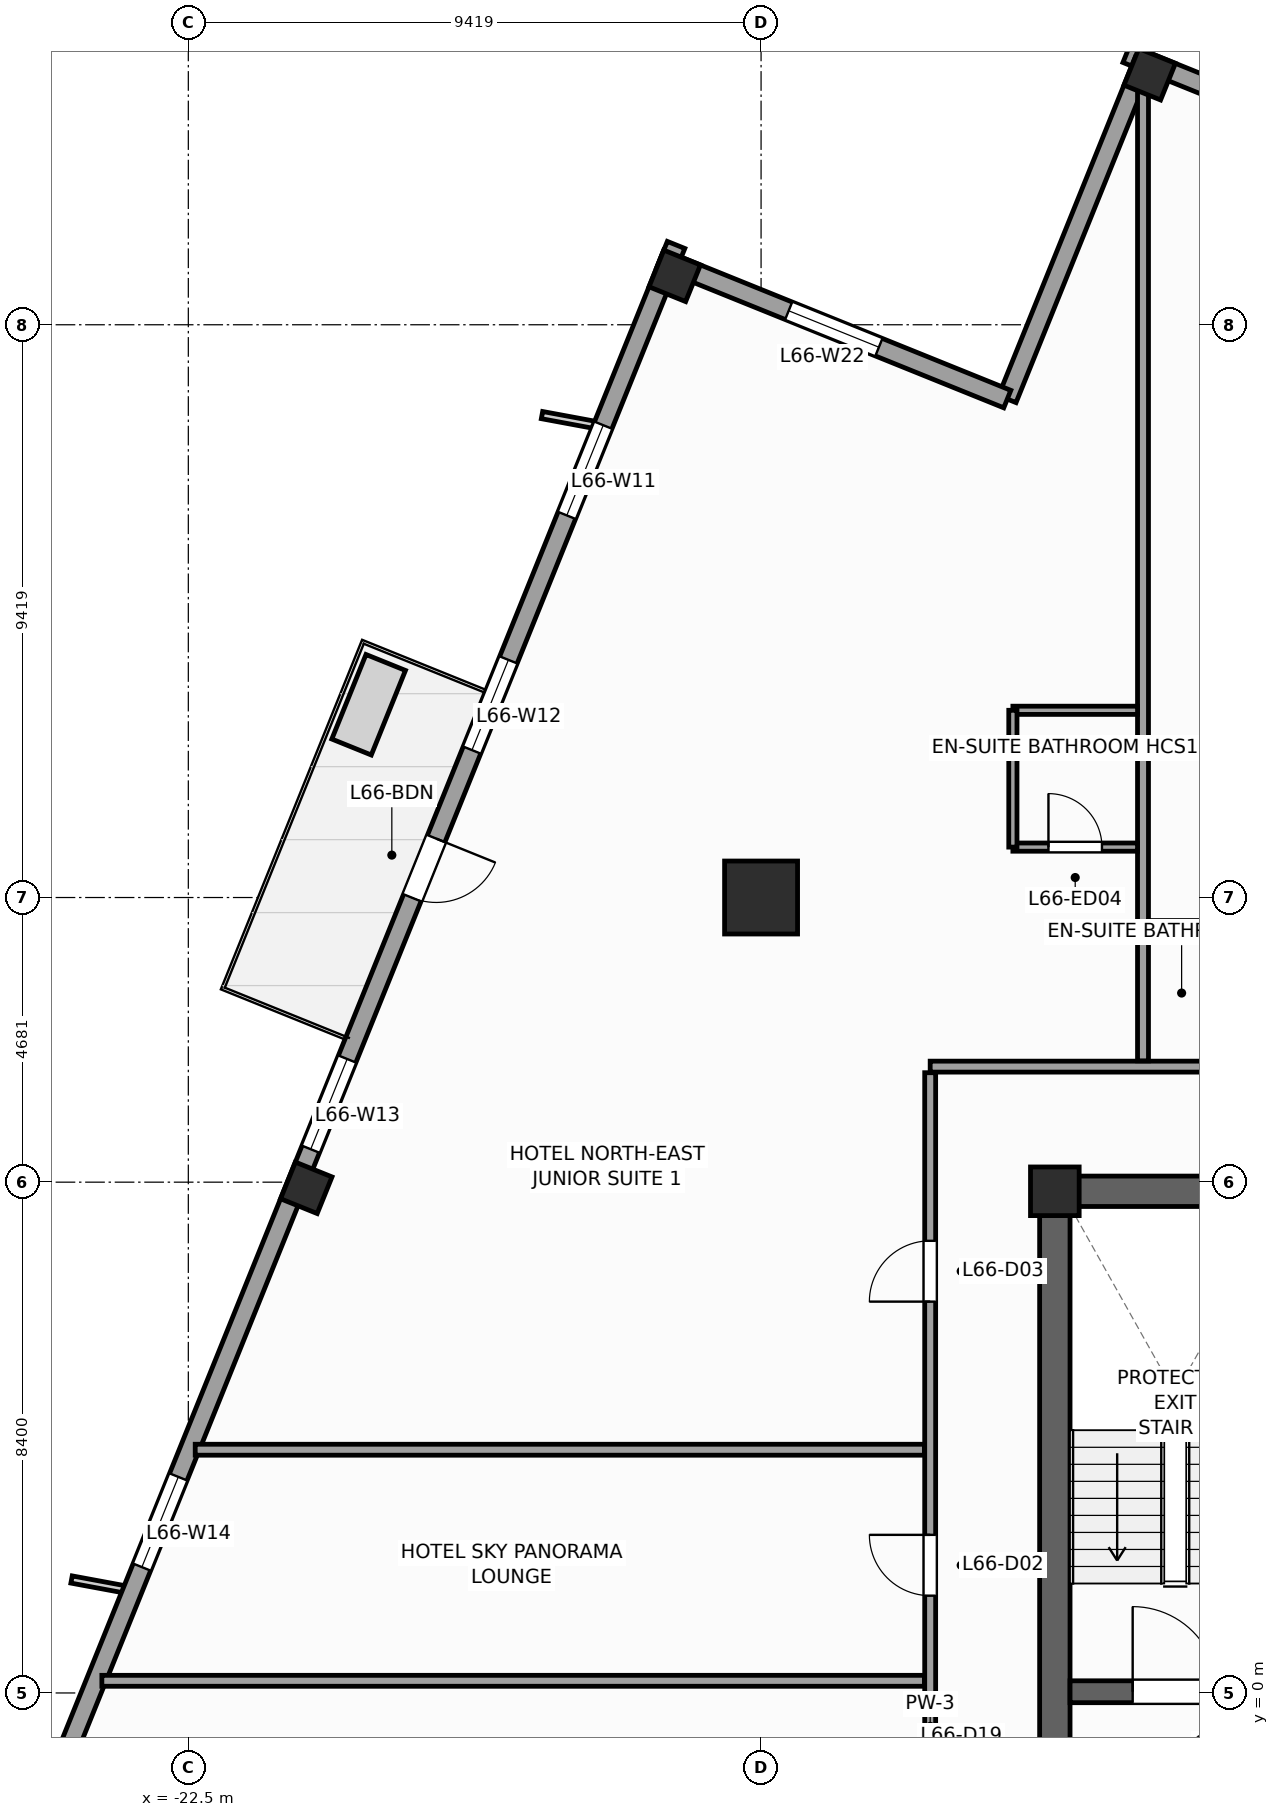
"""IFC4 building model, lengths in metres.
Left out: names, types, materials, properties, quantities, classifications, styles, units other than length and angle.
Written with IfcOpenShell. Run it as: python <this file> out.ifc"""

import sys

from ifc_helpers import new_model, si_unit, direction, frame, frame_2d, origin, origin_2d, place, context, subcontext, project, spatial, rectangle, extrude, source, transform, mapped, element, fill, save


model = new_model("IFC4")
c1 = context("Model", 3, precision=1e-05, world=origin(), true_north=direction((0.0, 1.0)))
c2 = subcontext(c1, "Body", "Model", "MODEL_VIEW")
j1 = project(units=[si_unit("LENGTHUNIT", "METRE"), si_unit("PLANEANGLEUNIT", "RADIAN")], contexts=[c1])
p1 = place(None, origin())
s1 = spatial("IfcSite", under=j1, at=p1, CompositionType="ELEMENT")
p2 = place(p1, origin())
s2 = spatial("IfcBuilding", under=s1, at=p2, CompositionType="ELEMENT")
p3 = place(p2, frame((0.0, 0.0, 272.4)))
s3 = spatial("IfcBuildingStorey", under=s2, at=p3, CompositionType="ELEMENT", Elevation=272.4)
p4 = place(p3, frame((-8.5, 8.25, 0.0), z_axis=(0.0, 0.0, 1.0), x_axis=(1.0, 0.0, 0.0)))
e1 = element("IfcWall", 1, at=p4, inside=s3, PredefinedType="SHEAR", context=c2, shape_type="SweptSolid", body=[
    extrude(rectangle(XDim=17.0, YDim=0.5, at=frame_2d((8.5, 0.0))), origin(), (0.0, 0.0, 1.0), 3.6),
])
p5 = place(p3, frame((-8.25, -8.0, 0.0), z_axis=(0.0, 0.0, 1.0), x_axis=(0.0, 1.0, 0.0)))
e2 = element("IfcWall", 2, at=p5, inside=s3, PredefinedType="SHEAR", context=c2, shape_type="SweptSolid", body=[
    extrude(rectangle(XDim=16.0, YDim=0.5, at=frame_2d((8.0, 0.0))), origin(), (0.0, 0.0, 1.0), 3.6),
])
p6 = place(p5, frame((4.69, 0.0, 0.0)))
e3 = element("IfcOpeningElement", 3, at=p6, cuts=e2, PredefinedType="OPENING", context=c2, shape_type="SweptSolid", body=[
    extrude(rectangle(XDim=1.3, YDim=2.2, at=frame_2d((0.65, 1.1))), frame((0.0, 0.26, 0.0), z_axis=(0.0, -1.0, 0.0), x_axis=(1.0, 0.0, 0.0)), (0.0, 0.0, 1.0), 0.52),
])
p7 = place(p3, frame((-8.0, 0.02, 0.0), z_axis=(0.0, 0.0, 1.0), x_axis=(1.0, 0.0, 0.0)))
e4 = element("IfcWall", 4, at=p7, inside=s3, PredefinedType="SHEAR", context=c2, shape_type="SweptSolid", body=[
    extrude(rectangle(XDim=3.46, YDim=0.36, at=frame_2d((1.73, 0.0))), origin(), (0.0, 0.0, 1.0), 3.6),
])
p8 = place(p7, frame((1.03, 0.0, 0.0)))
e5 = element("IfcOpeningElement", 5, at=p8, cuts=e4, PredefinedType="OPENING", context=c2, shape_type="SweptSolid", body=[
    extrude(rectangle(XDim=1.4, YDim=2.2, at=frame_2d((0.7, 1.1))), frame((0.0, 0.19, 0.0), z_axis=(0.0, -1.0, 0.0), x_axis=(1.0, 0.0, 0.0)), (0.0, 0.0, 1.0), 0.38),
])
m1 = source(origin(), c2, "Body", "SweptSolid", [
    extrude(rectangle(XDim=0.8, YDim=0.8, at=origin_2d()), origin(), (0.0, 0.0, 1.0), 3.6),
])
p9 = place(p3, frame((-8.25, 8.25, 0.0), z_axis=(0.0, 0.0, 1.0), x_axis=(1.0, 0.0, 0.0)))
e6 = element("IfcColumn", 6, at=p9, inside=s3, PredefinedType="PILASTER", context=c2, shape_type="MappedRepresentation", body=[
    mapped(m1, transform((0.0, 0.0, 0.0), scale=1.0)),
])
m2 = source(origin(), c2, "Body", "SweptSolid", [
    extrude(rectangle(XDim=1.2, YDim=1.2, at=origin_2d()), origin(), (0.0, 0.0, 1.0), 3.6),
])
p10 = place(p3, frame((-13.081, 13.081, 0.0), z_axis=(0.0, 0.0, 1.0), x_axis=(1.0, 0.0, 0.0)))
e7 = element("IfcColumn", 7, at=p10, inside=s3, PredefinedType="COLUMN", context=c2, shape_type="MappedRepresentation", body=[
    mapped(m2, transform((0.0, 0.0, 0.0), scale=1.0)),
])
m3 = source(origin(), c2, "Body", "SweptSolid", [
    extrude(rectangle(XDim=0.65, YDim=0.65, at=origin_2d()), origin(), (0.0, 0.0, 1.0), 3.6),
])
for number, where, z_axis, x_axis in (
    (8, (-6.69, 26.62, 0.0), (0.0, 0.0, 1.0), (0.375, 0.927, 0.0)),
    (9, (-14.501, 23.304, 0.0), (0.0, 0.0, 1.0), (0.375, 0.927, 0.0)),
    (10, (-20.56, 8.307, 0.0), (0.0, 0.0, 1.0), (0.375, 0.927, 0.0)),
):
    element("IfcColumn", number, at=place(p3, frame(where, z_axis=z_axis, x_axis=x_axis)), inside=s3, PredefinedType="COLUMN", context=c2, shape_type="MappedRepresentation", body=[
        mapped(m3, transform((0.0, 0.0, 0.0), scale=1.0)),
    ])
p11 = place(p3, frame((23.813, 14.479, 0.0), z_axis=(0.0, 0.0, 1.0), x_axis=(-0.927182657188, 0.374609557019, 0.0)))
e11 = element("IfcWall", 11, at=p11, inside=s3, PredefinedType="STANDARD", context=c2, shape_type="SweptSolid", body=[
    extrude(rectangle(XDim=33.31, YDim=0.31, at=frame_2d((16.655, 0.0))), origin(), (0.0, 0.0, 1.0), 2.75),
])
p12 = place(p11, frame((3.197, 0.0, 0.47)))
e12 = element("IfcOpeningElement", 12, at=p12, cuts=e11, PredefinedType="OPENING", context=c2, shape_type="SweptSolid", body=[
    extrude(rectangle(XDim=1.6, YDim=2.1, at=frame_2d((0.8, 1.05))), frame((0.0, 0.165, 0.0), z_axis=(0.0, -1.0, 0.0), x_axis=(1.0, 0.0, 0.0)), (0.0, 0.0, 1.0), 0.33),
])
p13 = place(p11, frame((8.86, 0.0, 0.47)))
e13 = element("IfcOpeningElement", 13, at=p13, cuts=e11, PredefinedType="OPENING", context=c2, shape_type="SweptSolid", body=[
    extrude(rectangle(XDim=1.6, YDim=2.1, at=frame_2d((0.8, 1.05))), frame((0.0, 0.165, 0.0), z_axis=(0.0, -1.0, 0.0), x_axis=(1.0, 0.0, 0.0)), (0.0, 0.0, 1.0), 0.33),
])
p14 = place(p11, frame((13.689, 0.0, 0.47)))
e14 = element("IfcOpeningElement", 14, at=p14, cuts=e11, PredefinedType="OPENING", context=c2, shape_type="SweptSolid", body=[
    extrude(rectangle(XDim=1.6, YDim=2.1, at=frame_2d((0.8, 1.05))), frame((0.0, 0.165, 0.0), z_axis=(0.0, -1.0, 0.0), x_axis=(1.0, 0.0, 0.0)), (0.0, 0.0, 1.0), 0.33),
])
p15 = place(p11, frame((21.851, 0.0, 0.47)))
e15 = element("IfcOpeningElement", 15, at=p15, cuts=e11, PredefinedType="OPENING", context=c2, shape_type="SweptSolid", body=[
    extrude(rectangle(XDim=1.6, YDim=2.1, at=frame_2d((0.8, 1.05))), frame((0.0, 0.165, 0.0), z_axis=(0.0, -1.0, 0.0), x_axis=(1.0, 0.0, 0.0)), (0.0, 0.0, 1.0), 0.33),
])
p16 = place(p11, frame((27.847, 0.0, 0.47)))
e16 = element("IfcOpeningElement", 16, at=p16, cuts=e11, PredefinedType="OPENING", context=c2, shape_type="SweptSolid", body=[
    extrude(rectangle(XDim=1.6, YDim=2.1, at=frame_2d((0.8, 1.05))), frame((0.0, 0.165, 0.0), z_axis=(0.0, -1.0, 0.0), x_axis=(1.0, 0.0, 0.0)), (0.0, 0.0, 1.0), 0.33),
])
p17 = place(p3, frame((-6.784, 26.841, 0.0), z_axis=(0.0, 0.0, 1.0), x_axis=(-0.374636620962, -0.927171722085, 0.0)))
e17 = element("IfcWall", 17, at=p17, inside=s3, PredefinedType="STANDARD", context=c2, shape_type="SweptSolid", body=[
    extrude(rectangle(XDim=6.0, YDim=0.31, at=frame_2d((3.0, 0.0))), origin(), (0.0, 0.0, 1.0), 2.65),
])
p18 = place(p3, frame((-9.032, 21.278, 0.0), z_axis=(0.0, 0.0, 1.0), x_axis=(-0.927185411764, 0.374602739196, 0.0)))
e18 = element("IfcWall", 18, at=p18, inside=s3, PredefinedType="STANDARD", context=c2, shape_type="SweptSolid", body=[
    extrude(rectangle(XDim=6.155, YDim=0.31, at=frame_2d((3.078, 0.0))), origin(), (0.0, 0.0, 1.0), 3.35),
])
p19 = place(p18, frame((2.278, 0.0, 0.47)))
e19 = element("IfcOpeningElement", 19, at=p19, cuts=e18, PredefinedType="OPENING", context=c2, shape_type="SweptSolid", body=[
    extrude(rectangle(XDim=1.6, YDim=2.1, at=frame_2d((0.8, 1.05))), frame((0.0, 0.165, 0.0), z_axis=(0.0, -1.0, 0.0), x_axis=(1.0, 0.0, 0.0)), (0.0, 0.0, 1.0), 0.33),
])
p20 = place(p3, frame((-14.479, 23.813, 0.0), z_axis=(0.0, 0.0, 1.0), x_axis=(-0.374609557019, -0.927182657188, 0.0)))
e20 = element("IfcWall", 20, at=p20, inside=s3, PredefinedType="STANDARD", context=c2, shape_type="SweptSolid", body=[
    extrude(rectangle(XDim=33.31, YDim=0.31, at=frame_2d((16.655, 0.0))), origin(), (0.0, 0.0, 1.0), 2.75),
])
p21 = place(p20, frame((10.53, 0.0, 0.0)))
e21 = element("IfcOpeningElement", 21, at=p21, cuts=e20, PredefinedType="OPENING", context=c2, shape_type="SweptSolid", body=[
    extrude(rectangle(XDim=1.05, YDim=2.25, at=frame_2d((0.525, 1.125))), frame((0.0, 0.165, 0.0), z_axis=(0.0, -1.0, 0.0), x_axis=(1.0, 0.0, 0.0)), (0.0, 0.0, 1.0), 0.33),
])
p22 = place(p20, frame((3.197, 0.0, 0.47)))
e22 = element("IfcOpeningElement", 22, at=p22, cuts=e20, PredefinedType="OPENING", context=c2, shape_type="SweptSolid", body=[
    extrude(rectangle(XDim=1.6, YDim=2.1, at=frame_2d((0.8, 1.05))), frame((0.0, 0.165, 0.0), z_axis=(0.0, -1.0, 0.0), x_axis=(1.0, 0.0, 0.0)), (0.0, 0.0, 1.0), 0.33),
])
p23 = place(p20, frame((7.36, 0.0, 0.47)))
e23 = element("IfcOpeningElement", 23, at=p23, cuts=e20, PredefinedType="OPENING", context=c2, shape_type="SweptSolid", body=[
    extrude(rectangle(XDim=1.6, YDim=2.1, at=frame_2d((0.8, 1.05))), frame((0.0, 0.165, 0.0), z_axis=(0.0, -1.0, 0.0), x_axis=(1.0, 0.0, 0.0)), (0.0, 0.0, 1.0), 0.33),
])
p24 = place(p20, frame((14.439, 0.0, 0.47)))
e24 = element("IfcOpeningElement", 24, at=p24, cuts=e20, PredefinedType="OPENING", context=c2, shape_type="SweptSolid", body=[
    extrude(rectangle(XDim=1.6, YDim=2.1, at=frame_2d((0.8, 1.05))), frame((0.0, 0.165, 0.0), z_axis=(0.0, -1.0, 0.0), x_axis=(1.0, 0.0, 0.0)), (0.0, 0.0, 1.0), 0.33),
])
p25 = place(p20, frame((21.851, 0.0, 0.47)))
e25 = element("IfcOpeningElement", 25, at=p25, cuts=e20, PredefinedType="OPENING", context=c2, shape_type="SweptSolid", body=[
    extrude(rectangle(XDim=1.6, YDim=2.1, at=frame_2d((0.8, 1.05))), frame((0.0, 0.165, 0.0), z_axis=(0.0, -1.0, 0.0), x_axis=(1.0, 0.0, 0.0)), (0.0, 0.0, 1.0), 0.33),
])
p26 = place(p20, frame((30.097, 0.0, 0.47)))
e26 = element("IfcOpeningElement", 26, at=p26, cuts=e20, PredefinedType="OPENING", context=c2, shape_type="SweptSolid", body=[
    extrude(rectangle(XDim=1.6, YDim=2.1, at=frame_2d((0.8, 1.05))), frame((0.0, 0.165, 0.0), z_axis=(0.0, -1.0, 0.0), x_axis=(1.0, 0.0, 0.0)), (0.0, 0.0, 1.0), 0.33),
])
p27 = place(p20, frame((27.374, 0.0, 0.47)))
e27 = element("IfcOpeningElement", 27, at=p27, cuts=e20, PredefinedType="OPENING", context=c2, shape_type="SweptSolid", body=[
    extrude(rectangle(XDim=1.6, YDim=2.1, at=frame_2d((0.8, 1.05))), frame((0.0, 0.165, 0.0), z_axis=(0.0, -1.0, 0.0), x_axis=(1.0, 0.0, 0.0)), (0.0, 0.0, 1.0), 0.33),
])
p28 = place(p3, frame((-10.3, 10.3, 0.0), z_axis=(0.0, 0.0, 1.0), x_axis=(1.0, 0.0, 0.0)))
e28 = element("IfcWall", 28, at=p28, inside=s3, PredefinedType="PARTITIONING", context=c2, shape_type="SweptSolid", body=[
    extrude(rectangle(XDim=21.7, YDim=0.18, at=frame_2d((10.85, 0.0))), origin(), (0.0, 0.0, 1.0), 3.35),
])
p29 = place(p28, frame((9.8, 0.0, 0.0)))
e29 = element("IfcOpeningElement", 29, at=p29, cuts=e28, PredefinedType="OPENING", context=c2, shape_type="SweptSolid", body=[
    extrude(rectangle(XDim=1.0, YDim=2.15, at=frame_2d((0.5, 1.075))), frame((0.0, 0.1, 0.0), z_axis=(0.0, -1.0, 0.0), x_axis=(1.0, 0.0, 0.0)), (0.0, 0.0, 1.0), 0.2),
])
p30 = place(p3, frame((-10.3, -11.3, 0.0), z_axis=(0.0, 0.0, 1.0), x_axis=(0.0, 1.0, 0.0)))
e30 = element("IfcWall", 30, at=p30, inside=s3, PredefinedType="PARTITIONING", context=c2, shape_type="SweptSolid", body=[
    extrude(rectangle(XDim=21.5, YDim=0.18, at=frame_2d((10.75, 0.0))), origin(), (0.0, 0.0, 1.0), 3.35),
])
p31 = place(p30, frame((12.9, 0.0, 0.0)))
e31 = element("IfcOpeningElement", 31, at=p31, cuts=e30, PredefinedType="OPENING", context=c2, shape_type="SweptSolid", body=[
    extrude(rectangle(XDim=1.0, YDim=2.15, at=frame_2d((0.5, 1.075))), frame((0.0, 0.1, 0.0), z_axis=(0.0, -1.0, 0.0), x_axis=(1.0, 0.0, 0.0)), (0.0, 0.0, 1.0), 0.2),
])
p32 = place(p30, frame((17.736, 0.0, 0.0)))
e32 = element("IfcOpeningElement", 32, at=p32, cuts=e30, PredefinedType="OPENING", context=c2, shape_type="SweptSolid", body=[
    extrude(rectangle(XDim=1.0, YDim=2.15, at=frame_2d((0.5, 1.075))), frame((0.0, 0.1, 0.0), z_axis=(0.0, -1.0, 0.0), x_axis=(1.0, 0.0, 0.0)), (0.0, 0.0, 1.0), 0.2),
])
p33 = place(p30, frame((1.714, 0.0, 0.0)))
e33 = element("IfcOpeningElement", 33, at=p33, cuts=e30, PredefinedType="OPENING", context=c2, shape_type="SweptSolid", body=[
    extrude(rectangle(XDim=1.0, YDim=2.15, at=frame_2d((0.5, 1.075))), frame((0.0, 0.1, 0.0), z_axis=(0.0, -1.0, 0.0), x_axis=(1.0, 0.0, 0.0)), (0.0, 0.0, 1.0), 0.2),
])
p34 = place(p30, frame((5.4, 0.0, 0.0)))
e34 = element("IfcOpeningElement", 34, at=p34, cuts=e30, PredefinedType="OPENING", context=c2, shape_type="SweptSolid", body=[
    extrude(rectangle(XDim=1.0, YDim=2.15, at=frame_2d((0.5, 1.075))), frame((0.0, 0.1, 0.0), z_axis=(0.0, -1.0, 0.0), x_axis=(1.0, 0.0, 0.0)), (0.0, 0.0, 1.0), 0.2),
])
p35 = place(p30, frame((9.1, 0.0, 0.0)))
e35 = element("IfcOpeningElement", 35, at=p35, cuts=e30, PredefinedType="OPENING", context=c2, shape_type="SweptSolid", body=[
    extrude(rectangle(XDim=1.0, YDim=2.15, at=frame_2d((0.5, 1.075))), frame((0.0, 0.1, 0.0), z_axis=(0.0, -1.0, 0.0), x_axis=(1.0, 0.0, 0.0)), (0.0, 0.0, 1.0), 0.2),
])
p36 = place(p3, frame((-6.8, 10.395, 0.0), z_axis=(0.0, 0.0, 1.0), x_axis=(0.0, 1.0, 0.0)))
e36 = element("IfcWall", 36, at=p36, inside=s3, PredefinedType="PARTITIONING", context=c2, shape_type="SweptSolid", body=[
    extrude(rectangle(XDim=16.167, YDim=0.18, at=frame_2d((8.083, 0.0))), origin(), (0.0, 0.0, 1.0), 3.35),
])
p37 = place(p3, frame((-10.395, 0.2, 0.0), z_axis=(0.0, 0.0, 1.0), x_axis=(-1.0, 0.0, 0.0)))
e37 = element("IfcWall", 37, at=p37, inside=s3, PredefinedType="PARTITIONING", context=c2, shape_type="SweptSolid", body=[
    extrude(rectangle(XDim=13.527, YDim=0.18, at=frame_2d((6.763, 0.0))), origin(), (0.0, 0.0, 1.0), 3.35),
])
p38 = place(p3, frame((-10.395, 4.0, 0.0), z_axis=(0.0, 0.0, 1.0), x_axis=(-1.0, 0.0, 0.0)))
e38 = element("IfcWall", 38, at=p38, inside=s3, PredefinedType="PARTITIONING", context=c2, shape_type="SweptSolid", body=[
    extrude(rectangle(XDim=11.992, YDim=0.18, at=frame_2d((5.996, 0.0))), origin(), (0.0, 0.0, 1.0), 3.35),
])
p39 = place(p3, frame((-8.94, 13.91, 0.0), z_axis=(0.0, 0.0, 1.0), x_axis=(1.0, 0.0, 0.0)))
e39 = element("IfcWall", 39, at=p39, inside=s3, PredefinedType="PARTITIONING", context=c2, shape_type="SweptSolid", body=[
    extrude(rectangle(XDim=2.05, YDim=0.135, at=frame_2d((1.025, 0.0))), origin(), (0.0, 0.0, 1.0), 3.35),
])
p40 = place(p39, frame((0.585, 0.0, 0.0)))
e40 = element("IfcOpeningElement", 40, at=p40, cuts=e39, PredefinedType="OPENING", context=c2, shape_type="SweptSolid", body=[
    extrude(rectangle(XDim=0.88, YDim=2.1, at=frame_2d((0.44, 1.05))), frame((0.0, 0.078, 0.0), z_axis=(0.0, -1.0, 0.0), x_axis=(1.0, 0.0, 0.0)), (0.0, 0.0, 1.0), 0.155),
])
p41 = place(p3, frame((-8.94, 16.16, 0.0), z_axis=(0.0, 0.0, 1.0), x_axis=(1.0, 0.0, 0.0)))
e41 = element("IfcWall", 41, at=p41, inside=s3, PredefinedType="PARTITIONING", context=c2, shape_type="SweptSolid", body=[
    extrude(rectangle(XDim=2.05, YDim=0.135, at=frame_2d((1.025, 0.0))), origin(), (0.0, 0.0, 1.0), 3.35),
])
p42 = place(p3, frame((-8.94, 13.91, 0.0), z_axis=(0.0, 0.0, 1.0), x_axis=(0.0, 1.0, 0.0)))
e42 = element("IfcWall", 42, at=p42, inside=s3, PredefinedType="PARTITIONING", context=c2, shape_type="SweptSolid", body=[
    extrude(rectangle(XDim=2.25, YDim=0.135, at=frame_2d((1.125, 0.0))), origin(), (0.0, 0.0, 1.0), 3.35),
])
p43 = place(p3, frame((-6.71, 12.635, 0.0), z_axis=(0.0, 0.0, 1.0), x_axis=(1.0, 0.0, 0.0)))
e43 = element("IfcWall", 43, at=p43, inside=s3, PredefinedType="PARTITIONING", context=c2, shape_type="SweptSolid", body=[
    extrude(rectangle(XDim=2.05, YDim=0.135, at=frame_2d((1.025, 0.0))), origin(), (0.0, 0.0, 1.0), 3.35),
])
m4 = source(origin(), c2, "Body", "SweptSolid", [
    extrude(rectangle(XDim=1.05, YDim=2.25, at=frame_2d((0.525, 1.125))), frame((0.0, 0.025, 0.0), z_axis=(0.0, -1.0, 0.0), x_axis=(1.0, 0.0, 0.0)), (0.0, 0.0, 1.0), 0.05),
])
p44 = place(p21, origin())
e44 = element("IfcDoor", 44, at=p44, inside=s3, OperationType="SINGLE_SWING_LEFT", PredefinedType="DOOR", context=c2, shape_type="MappedRepresentation", body=[
    mapped(m4, transform((0.0, 0.0, 0.0), scale=1.0)),
])
fill(e21, e44)
m5 = source(origin(), c2, "Body", "SweptSolid", [
    extrude(rectangle(XDim=1.6, YDim=2.1, at=frame_2d((0.8, 1.05))), frame((0.0, 0.03, 0.0), z_axis=(0.0, -1.0, 0.0), x_axis=(1.0, 0.0, 0.0)), (0.0, 0.0, 1.0), 0.06),
])
p45 = place(p22, origin())
e45 = element("IfcWindow", 45, at=p45, inside=s3, PartitioningType="SINGLE_PANEL", PredefinedType="WINDOW", context=c2, shape_type="MappedRepresentation", body=[
    mapped(m5, transform((0.0, 0.0, 0.0), scale=1.0)),
])
fill(e22, e45)
p46 = place(p23, origin())
e46 = element("IfcWindow", 46, at=p46, inside=s3, PartitioningType="SINGLE_PANEL", PredefinedType="WINDOW", context=c2, shape_type="MappedRepresentation", body=[
    mapped(m5, transform((0.0, 0.0, 0.0), scale=1.0)),
])
fill(e23, e46)
p47 = place(p24, origin())
e47 = element("IfcWindow", 47, at=p47, inside=s3, PartitioningType="SINGLE_PANEL", PredefinedType="WINDOW", context=c2, shape_type="MappedRepresentation", body=[
    mapped(m5, transform((0.0, 0.0, 0.0), scale=1.0)),
])
fill(e24, e47)
p48 = place(p25, origin())
e48 = element("IfcWindow", 48, at=p48, inside=s3, PartitioningType="SINGLE_PANEL", PredefinedType="WINDOW", context=c2, shape_type="MappedRepresentation", body=[
    mapped(m5, transform((0.0, 0.0, 0.0), scale=1.0)),
])
fill(e25, e48)
p49 = place(p19, origin())
e49 = element("IfcWindow", 49, at=p49, inside=s3, PartitioningType="SINGLE_PANEL", PredefinedType="WINDOW", context=c2, shape_type="MappedRepresentation", body=[
    mapped(m5, transform((0.0, 0.0, 0.0), scale=1.0)),
])
fill(e19, e49)
m6 = source(origin(), c2, "Body", "SweptSolid", [
    extrude(rectangle(XDim=1.4, YDim=2.2, at=frame_2d((0.7, 1.1))), frame((0.0, 0.025, 0.0), z_axis=(0.0, -1.0, 0.0), x_axis=(1.0, 0.0, 0.0)), (0.0, 0.0, 1.0), 0.05),
])
p50 = place(p8, origin())
e50 = element("IfcDoor", 50, at=p50, inside=s3, OperationType="SINGLE_SWING_LEFT", PredefinedType="DOOR", context=c2, shape_type="MappedRepresentation", body=[
    mapped(m6, transform((0.0, 0.0, 0.0), scale=1.0)),
])
fill(e5, e50)
m7 = source(origin(), c2, "Body", "SweptSolid", [
    extrude(rectangle(XDim=1.0, YDim=2.15, at=frame_2d((0.5, 1.075))), frame((0.0, 0.025, 0.0), z_axis=(0.0, -1.0, 0.0), x_axis=(1.0, 0.0, 0.0)), (0.0, 0.0, 1.0), 0.05),
])
p51 = place(p31, origin())
e51 = element("IfcDoor", 51, at=p51, inside=s3, OperationType="SINGLE_SWING_RIGHT", PredefinedType="DOOR", context=c2, shape_type="MappedRepresentation", body=[
    mapped(m7, transform((0.0, 0.0, 0.0), scale=1.0)),
])
fill(e31, e51)
p52 = place(p32, origin())
e52 = element("IfcDoor", 52, at=p52, inside=s3, OperationType="SINGLE_SWING_LEFT", PredefinedType="DOOR", context=c2, shape_type="MappedRepresentation", body=[
    mapped(m7, transform((0.0, 0.0, 0.0), scale=1.0)),
])
fill(e32, e52)
m8 = source(origin(), c2, "Body", "SweptSolid", [
    extrude(rectangle(XDim=0.88, YDim=2.1, at=frame_2d((0.44, 1.05))), frame((0.0, 0.025, 0.0), z_axis=(0.0, -1.0, 0.0), x_axis=(1.0, 0.0, 0.0)), (0.0, 0.0, 1.0), 0.05),
])
p53 = place(p40, origin())
e53 = element("IfcDoor", 53, at=p53, inside=s3, OperationType="SINGLE_SWING_LEFT", PredefinedType="DOOR", context=c2, shape_type="MappedRepresentation", body=[
    mapped(m8, transform((0.0, 0.0, 0.0), scale=1.0)),
])
fill(e40, e53)
save(model, sys.argv[1])
